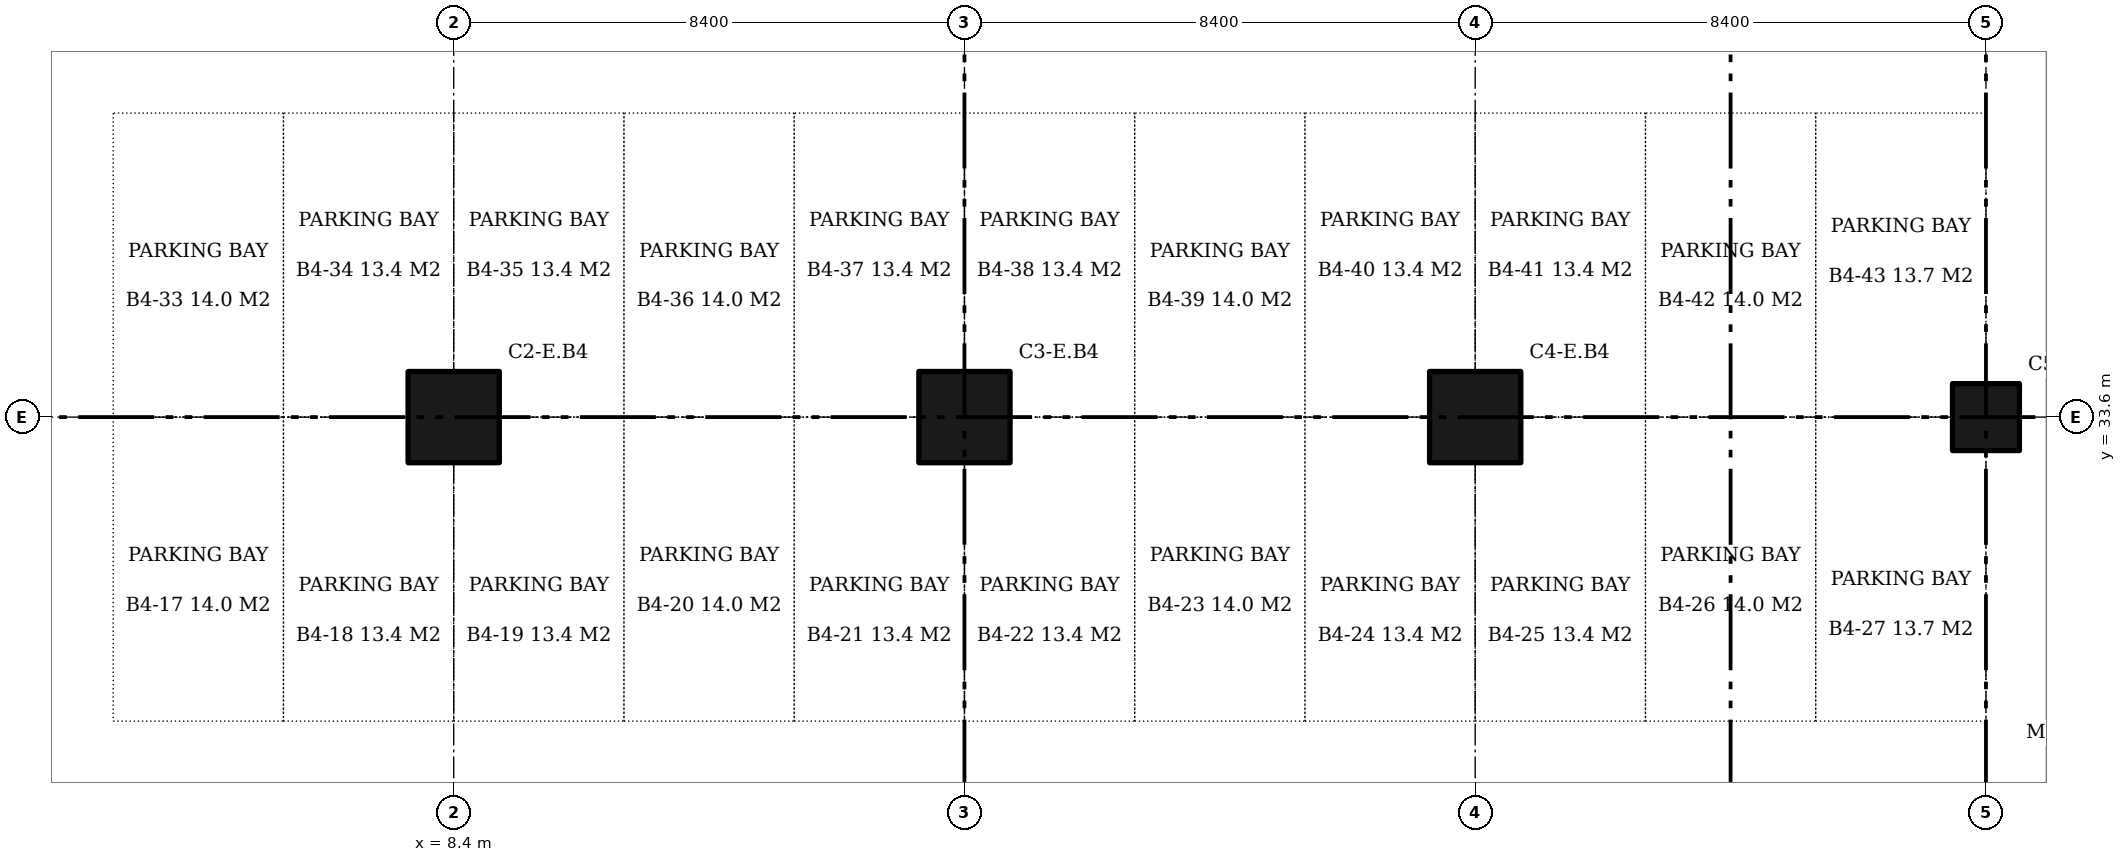
"""IFC4 building model, lengths in metres.
Left out: names, types, materials, properties, quantities, classifications, styles, units other than length and angle.
Written with IfcOpenShell. Run it as: python <this file> out.ifc"""

import sys

from ifc_helpers import new_model, si_unit, direction, frame, origin, origin_2d, place, context, subcontext, project, spatial, rectangle, extrude, element, save


model = new_model("IFC4")
c1 = context("Model", 3, precision=1e-05, world=origin(), true_north=direction((0.0, 1.0)))
c2 = subcontext(c1, "Body", "Model", "MODEL_VIEW")
j1 = project(units=[si_unit("LENGTHUNIT", "METRE"), si_unit("PLANEANGLEUNIT", "RADIAN")], contexts=[c1])
p1 = place(None, origin())
s1 = spatial("IfcSite", under=j1, at=p1, CompositionType="ELEMENT")
p2 = place(p1, origin())
s2 = spatial("IfcBuilding", under=s1, at=p2, CompositionType="ELEMENT")
p3 = place(p2, frame((0.0, 0.0, -16.0)))
s3 = spatial("IfcBuildingStorey", under=s2, at=p3, CompositionType="ELEMENT", Elevation=-16.0)
for number, where, z_axis, x_axis in (
    (1, (8.4, 33.6, 0.0), (0.0, 0.0, 1.0), (1.0, 0.0, 0.0)),
    (2, (16.8, 33.6, 0.0), (0.0, 0.0, 1.0), (1.0, 0.0, 0.0)),
    (3, (25.2, 33.6, 0.0), (0.0, 0.0, 1.0), (1.0, 0.0, 0.0)),
):
    element("IfcColumn", number, at=place(p3, frame(where, z_axis=z_axis, x_axis=x_axis)), inside=s3, PredefinedType="COLUMN", context=c2, shape_type="SweptSolid", body=[
        extrude(rectangle(XDim=1.5, YDim=1.5, at=origin_2d()), origin(), (0.0, 0.0, 1.0), 3.7),
    ])
p4 = place(p3, frame((33.6, 33.6, 0.0), z_axis=(0.0, 0.0, 1.0), x_axis=(1.0, 0.0, 0.0)))
e4 = element("IfcColumn", 4, at=p4, inside=s3, PredefinedType="COLUMN", context=c2, shape_type="SweptSolid", body=[
    extrude(rectangle(XDim=1.1, YDim=1.1, at=origin_2d()), origin(), (0.0, 0.0, 1.0), 3.7),
])
save(model, sys.argv[1])
